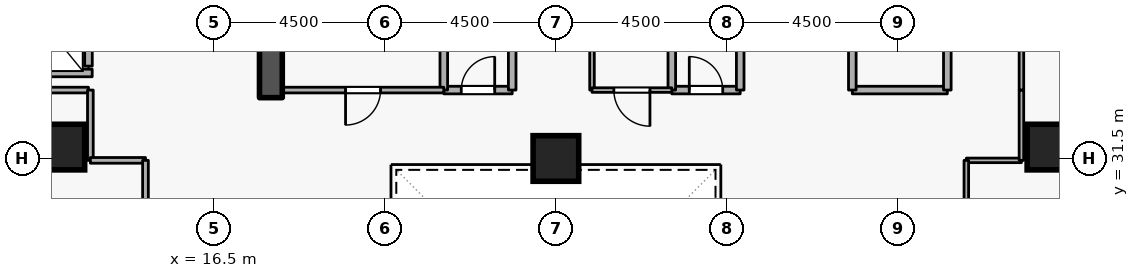
"""IFC4 building model, lengths in metres.
Left out: names, types, materials, properties, quantities, classifications, styles, units other than length and angle.
Written with IfcOpenShell. Run it as: python <this file> out.ifc"""

import sys

from ifc_helpers import new_model, si_unit, direction, frame, frame_2d, origin, origin_2d, place, context, subcontext, project, spatial, rectangle, extrude, element, fill, save


model = new_model("IFC4")
c1 = context("Model", 3, precision=1e-05, world=origin(), true_north=direction((0.0, 1.0)))
c2 = subcontext(c1, "Body", "Model", "MODEL_VIEW")
j1 = project(units=[si_unit("LENGTHUNIT", "METRE"), si_unit("PLANEANGLEUNIT", "RADIAN")], contexts=[c1])
p1 = place(None, origin())
s1 = spatial("IfcSite", under=j1, at=p1, CompositionType="ELEMENT")
p2 = place(p1, origin())
s2 = spatial("IfcBuilding", under=s1, at=p2, CompositionType="ELEMENT")
p3 = place(p2, frame((0.0, 0.0, 105.3)))
s3 = spatial("IfcBuildingStorey", under=s2, at=p3, CompositionType="ELEMENT", Elevation=105.3)
p4 = place(p3, frame((18.0, 33.1, 0.0), z_axis=(0.0, 0.0, 1.0), x_axis=(0.0, 1.0, 0.0)))
e1 = element("IfcWall", 1, at=p4, inside=s3, PredefinedType="SHEAR", context=c2, shape_type="SweptSolid", body=[
    extrude(rectangle(XDim=5.7, YDim=0.6, at=frame_2d((2.85, 0.0))), origin(), (0.0, 0.0, 1.0), 3.6),
])
for number, where, z_axis, x_axis in (
    (2, (12.5, 31.8, 0.0), (0.0, 0.0, 1.0), (1.0, 0.0, 0.0)),
    (3, (38.5, 31.8, 0.0), (0.0, 0.0, 1.0), (1.0, 0.0, 0.0)),
    (4, (25.5, 31.5, 0.0), (0.0, 0.0, 1.0), (1.0, 0.0, 0.0)),
):
    element("IfcColumn", number, at=place(p3, frame(where, z_axis=z_axis, x_axis=x_axis)), inside=s3, PredefinedType="COLUMN", context=c2, shape_type="SweptSolid", body=[
        extrude(rectangle(XDim=1.2, YDim=1.2, at=origin_2d()), origin(), (0.0, 0.0, 1.0), 3.6),
    ])
p5 = place(p3, frame((13.2, 33.93, 0.0), z_axis=(0.0, 0.0, 1.0), x_axis=(0.0, 1.0, 0.0)))
e5 = element("IfcWall", 5, at=p5, inside=s3, PredefinedType="STANDARD", context=c2, shape_type="SweptSolid", body=[
    extrude(rectangle(XDim=1.94, YDim=0.2, at=frame_2d((0.97, 0.0))), origin(), (0.0, 0.0, 1.0), 3.34),
])
p6 = place(p5, frame((0.46, 0.0, 0.0)))
e6 = element("IfcOpeningElement", 6, at=p6, cuts=e5, PredefinedType="OPENING", context=c2, shape_type="SweptSolid", body=[
    extrude(rectangle(XDim=1.02, YDim=2.06, at=frame_2d((0.51, 1.03))), frame((0.0, 0.11, 0.0), z_axis=(0.0, -1.0, 0.0), x_axis=(1.0, 0.0, 0.0)), (0.0, 0.0, 1.0), 0.22),
])
p7 = place(p3, frame((11.002, 33.75, 0.0), z_axis=(0.0, 0.0, 1.0), x_axis=(1.0, 0.0, 0.0)))
e7 = element("IfcWall", 7, at=p7, inside=s3, PredefinedType="STANDARD", context=c2, shape_type="SweptSolid", body=[
    extrude(rectangle(XDim=2.296, YDim=0.2, at=frame_2d((1.148, 0.0))), origin(), (0.0, 0.0, 1.0), 3.34),
])
p8 = place(p3, frame((33.3, 33.3, 0.0), z_axis=(0.0, 0.0, 1.0), x_axis=(1.0, 0.0, 0.0)))
e8 = element("IfcWall", 8, at=p8, inside=s3, PredefinedType="STANDARD", context=c2, shape_type="SweptSolid", body=[
    extrude(rectangle(XDim=2.5, YDim=0.2, at=frame_2d((1.25, 0.0))), origin(), (0.0, 0.0, 1.0), 3.34),
])
p9 = place(p3, frame((35.8, 33.3, 0.0), z_axis=(0.0, 0.0, 1.0), x_axis=(0.0, 1.0, 0.0)))
e9 = element("IfcWall", 9, at=p9, inside=s3, PredefinedType="STANDARD", context=c2, shape_type="SweptSolid", body=[
    extrude(rectangle(XDim=5.7, YDim=0.2, at=frame_2d((2.85, 0.0))), origin(), (0.0, 0.0, 1.0), 3.34),
])
p10 = place(p9, frame((2.275, 0.0, 0.0)))
e10 = element("IfcOpeningElement", 10, at=p10, cuts=e9, PredefinedType="OPENING", context=c2, shape_type="SweptSolid", body=[
    extrude(rectangle(XDim=1.15, YDim=2.1, at=frame_2d((0.575, 1.05))), frame((0.0, 0.11, 0.0), z_axis=(0.0, -1.0, 0.0), x_axis=(1.0, 0.0, 0.0)), (0.0, 0.0, 1.0), 0.22),
])
p11 = place(p3, frame((33.3, 35.6, 0.0), z_axis=(0.0, 0.0, 1.0), x_axis=(0.0, -1.0, 0.0)))
e11 = element("IfcWall", 11, at=p11, inside=s3, PredefinedType="STANDARD", context=c2, shape_type="SweptSolid", body=[
    extrude(rectangle(XDim=2.3, YDim=0.2, at=frame_2d((1.15, 0.0))), origin(), (0.0, 0.0, 1.0), 2.545),
])
p12 = place(p3, frame((22.55, 33.3, 0.0), z_axis=(0.0, 0.0, 1.0), x_axis=(1.0, 0.0, 0.0)))
e12 = element("IfcWall", 12, at=p12, inside=s3, PredefinedType="STANDARD", context=c2, shape_type="SweptSolid", body=[
    extrude(rectangle(XDim=1.8, YDim=0.2, at=frame_2d((0.9, 0.0))), origin(), (0.0, 0.0, 1.0), 3.34),
])
p13 = place(p12, frame((0.46, 0.0, 0.0)))
e13 = element("IfcOpeningElement", 13, at=p13, cuts=e12, PredefinedType="OPENING", context=c2, shape_type="SweptSolid", body=[
    extrude(rectangle(XDim=0.88, YDim=2.04, at=frame_2d((0.44, 1.02))), frame((0.0, 0.11, 0.0), z_axis=(0.0, -1.0, 0.0), x_axis=(1.0, 0.0, 0.0)), (0.0, 0.0, 1.0), 0.22),
])
for number, where, z_axis, x_axis in (
    (14, (24.35, 33.3, 0.0), (0.0, 0.0, 1.0), (0.0, 1.0, 0.0)),
    (15, (22.55, 35.35, 0.0), (0.0, 0.0, 1.0), (0.0, -1.0, 0.0)),
):
    element("IfcWall", number, at=place(p3, frame(where, z_axis=z_axis, x_axis=x_axis)), inside=s3, PredefinedType="STANDARD", context=c2, shape_type="SweptSolid", body=[
        extrude(rectangle(XDim=2.05, YDim=0.2, at=frame_2d((1.025, 0.0))), origin(), (0.0, 0.0, 1.0), 3.34),
    ])
p14 = place(p3, frame((28.55, 33.3, 0.0), z_axis=(0.0, 0.0, 1.0), x_axis=(1.0, 0.0, 0.0)))
e16 = element("IfcWall", 16, at=p14, inside=s3, PredefinedType="STANDARD", context=c2, shape_type="SweptSolid", body=[
    extrude(rectangle(XDim=1.8, YDim=0.2, at=frame_2d((0.9, 0.0))), origin(), (0.0, 0.0, 1.0), 3.34),
])
p15 = place(p14, frame((0.46, 0.0, 0.0)))
e17 = element("IfcOpeningElement", 17, at=p15, cuts=e16, PredefinedType="OPENING", context=c2, shape_type="SweptSolid", body=[
    extrude(rectangle(XDim=0.88, YDim=2.04, at=frame_2d((0.44, 1.02))), frame((0.0, 0.11, 0.0), z_axis=(0.0, -1.0, 0.0), x_axis=(1.0, 0.0, 0.0)), (0.0, 0.0, 1.0), 0.22),
])
for number, where, z_axis, x_axis in (
    (18, (30.35, 33.3, 0.0), (0.0, 0.0, 1.0), (0.0, 1.0, 0.0)),
    (19, (28.55, 35.35, 0.0), (0.0, 0.0, 1.0), (0.0, -1.0, 0.0)),
):
    element("IfcWall", number, at=place(p3, frame(where, z_axis=z_axis, x_axis=x_axis)), inside=s3, PredefinedType="STANDARD", context=c2, shape_type="SweptSolid", body=[
        extrude(rectangle(XDim=2.05, YDim=0.2, at=frame_2d((1.025, 0.0))), origin(), (0.0, 0.0, 1.0), 3.34),
    ])
p16 = place(p3, frame((22.55, 33.3, 0.0), z_axis=(0.0, 0.0, 1.0), x_axis=(-1.0, 0.0, 0.0)))
e20 = element("IfcWall", 20, at=p16, inside=s3, PredefinedType="PARTITIONING", context=c2, shape_type="SweptSolid", body=[
    extrude(rectangle(XDim=4.25, YDim=0.15, at=frame_2d((2.125, 0.0))), origin(), (0.0, 0.0, 1.0), 3.34),
])
p17 = place(p16, frame((1.665, 0.0, 0.0)))
e21 = element("IfcOpeningElement", 21, at=p17, cuts=e20, PredefinedType="OPENING", context=c2, shape_type="SweptSolid", body=[
    extrude(rectangle(XDim=0.92, YDim=2.08, at=frame_2d((0.46, 1.04))), frame((0.0, 0.085, 0.0), z_axis=(0.0, -1.0, 0.0), x_axis=(1.0, 0.0, 0.0)), (0.0, 0.0, 1.0), 0.17),
])
p18 = place(p3, frame((26.45, 33.3, 0.0), z_axis=(0.0, 0.0, 1.0), x_axis=(0.0, 1.0, 0.0)))
e22 = element("IfcWall", 22, at=p18, inside=s3, PredefinedType="PARTITIONING", context=c2, shape_type="SweptSolid", body=[
    extrude(rectangle(XDim=2.05, YDim=0.12, at=frame_2d((1.025, 0.0))), origin(), (0.0, 0.0, 1.0), 3.34),
])
p19 = place(p3, frame((28.55, 33.3, 0.0), z_axis=(0.0, 0.0, 1.0), x_axis=(-1.0, 0.0, 0.0)))
e23 = element("IfcWall", 23, at=p19, inside=s3, PredefinedType="PARTITIONING", context=c2, shape_type="SweptSolid", body=[
    extrude(rectangle(XDim=2.1, YDim=0.12, at=frame_2d((1.05, 0.0))), origin(), (0.0, 0.0, 1.0), 3.34),
])
p20 = place(p19, frame((0.575, 0.0, 0.0)))
e24 = element("IfcOpeningElement", 24, at=p20, cuts=e23, PredefinedType="OPENING", context=c2, shape_type="SweptSolid", body=[
    extrude(rectangle(XDim=0.95, YDim=2.1, at=frame_2d((0.475, 1.05))), frame((0.0, 0.07, 0.0), z_axis=(0.0, -1.0, 0.0), x_axis=(1.0, 0.0, 0.0)), (0.0, 0.0, 1.0), 0.14),
])
p21 = place(p3, frame((10.9, 33.3, 0.0), z_axis=(0.0, 0.0, 1.0), x_axis=(1.0, 0.0, 0.0)))
e25 = element("IfcWall", 25, at=p21, inside=s3, PredefinedType="PARTITIONING", context=c2, shape_type="SweptSolid", body=[
    extrude(rectangle(XDim=2.3, YDim=0.15, at=frame_2d((1.15, 0.0))), origin(), (0.0, 0.0, 1.0), 3.34),
])
p22 = place(p3, frame((13.25, 33.3, 0.0), z_axis=(0.0, 0.0, 1.0), x_axis=(0.0, -1.0, 0.0)))
e26 = element("IfcWall", 26, at=p22, inside=s3, PredefinedType="PARTITIONING", context=c2, shape_type="SweptSolid", body=[
    extrude(rectangle(XDim=1.85, YDim=0.15, at=frame_2d((0.925, 0.0))), origin(), (0.0, 0.0, 1.0), 3.34),
])
p23 = place(p3, frame((13.25, 31.45, 0.0), z_axis=(0.0, 0.0, 1.0), x_axis=(1.0, 0.0, 0.0)))
e27 = element("IfcWall", 27, at=p23, inside=s3, PredefinedType="PARTITIONING", context=c2, shape_type="SweptSolid", body=[
    extrude(rectangle(XDim=1.45, YDim=0.15, at=frame_2d((0.725, 0.0))), origin(), (0.0, 0.0, 1.0), 3.34),
])
p24 = place(p3, frame((14.7, 31.45, 0.0), z_axis=(0.0, 0.0, 1.0), x_axis=(0.0, -1.0, 0.0)))
e28 = element("IfcWall", 28, at=p24, inside=s3, PredefinedType="PARTITIONING", context=c2, shape_type="SweptSolid", body=[
    extrude(rectangle(XDim=4.45, YDim=0.15, at=frame_2d((2.225, 0.0))), origin(), (0.0, 0.0, 1.0), 3.34),
])
p25 = place(p24, frame((1.575, 0.0, 0.0)))
e29 = element("IfcOpeningElement", 29, at=p25, cuts=e28, PredefinedType="OPENING", context=c2, shape_type="SweptSolid", body=[
    extrude(rectangle(XDim=1.3, YDim=2.12, at=frame_2d((0.65, 1.06))), frame((0.0, 0.085, 0.0), z_axis=(0.0, -1.0, 0.0), x_axis=(1.0, 0.0, 0.0)), (0.0, 0.0, 1.0), 0.17),
])
p26 = place(p3, frame((36.3, 31.45, 0.0), z_axis=(0.0, 0.0, 1.0), x_axis=(1.0, 0.0, 0.0)))
e30 = element("IfcWall", 30, at=p26, inside=s3, PredefinedType="PARTITIONING", context=c2, shape_type="SweptSolid", body=[
    extrude(rectangle(XDim=1.45, YDim=0.12, at=frame_2d((0.725, 0.0))), origin(), (0.0, 0.0, 1.0), 3.34),
])
p27 = place(p3, frame((37.75, 31.45, 0.0), z_axis=(0.0, 0.0, 1.0), x_axis=(0.0, 1.0, 0.0)))
e31 = element("IfcWall", 31, at=p27, inside=s3, PredefinedType="PARTITIONING", context=c2, shape_type="SweptSolid", body=[
    extrude(rectangle(XDim=1.85, YDim=0.12, at=frame_2d((0.925, 0.0))), origin(), (0.0, 0.0, 1.0), 3.34),
])
p28 = place(p3, frame((37.75, 33.3, 0.0), z_axis=(0.0, 0.0, 1.0), x_axis=(0.0, 1.0, 0.0)))
e32 = element("IfcWall", 32, at=p28, inside=s3, PredefinedType="PARTITIONING", context=c2, shape_type="SweptSolid", body=[
    extrude(rectangle(XDim=9.35, YDim=0.12, at=frame_2d((4.675, 0.0))), origin(), (0.0, 0.0, 1.0), 3.34),
])
p29 = place(p28, frame((4.15, 0.0, 0.0)))
e33 = element("IfcOpeningElement", 33, at=p29, cuts=e32, PredefinedType="OPENING", context=c2, shape_type="SweptSolid", body=[
    extrude(rectangle(XDim=1.05, YDim=2.1, at=frame_2d((0.525, 1.05))), frame((0.0, 0.07, 0.0), z_axis=(0.0, -1.0, 0.0), x_axis=(1.0, 0.0, 0.0)), (0.0, 0.0, 1.0), 0.14),
])
p30 = place(p3, frame((36.3, 27.0, 0.0), z_axis=(0.0, 0.0, 1.0), x_axis=(0.0, 1.0, 0.0)))
e34 = element("IfcWall", 34, at=p30, inside=s3, PredefinedType="PARTITIONING", context=c2, shape_type="SweptSolid", body=[
    extrude(rectangle(XDim=4.45, YDim=0.12, at=frame_2d((2.225, 0.0))), origin(), (0.0, 0.0, 1.0), 3.34),
])
p31 = place(p13, origin())
e35 = element("IfcDoor", 35, at=p31, inside=s3, OperationType="SINGLE_SWING_RIGHT", PredefinedType="DOOR", context=c2, shape_type="SweptSolid", body=[
    extrude(rectangle(XDim=0.88, YDim=2.04, at=frame_2d((0.44, 1.02))), frame((0.0, 0.025, 0.0), z_axis=(0.0, -1.0, 0.0), x_axis=(1.0, 0.0, 0.0)), (0.0, 0.0, 1.0), 0.05),
])
fill(e13, e35)
p32 = place(p15, origin())
e36 = element("IfcDoor", 36, at=p32, inside=s3, OperationType="SINGLE_SWING_LEFT", PredefinedType="DOOR", context=c2, shape_type="SweptSolid", body=[
    extrude(rectangle(XDim=0.88, YDim=2.04, at=frame_2d((0.44, 1.02))), frame((0.0, 0.025, 0.0), z_axis=(0.0, -1.0, 0.0), x_axis=(1.0, 0.0, 0.0)), (0.0, 0.0, 1.0), 0.05),
])
fill(e17, e36)
p33 = place(p17, origin())
e37 = element("IfcDoor", 37, at=p33, inside=s3, OperationType="SINGLE_SWING_RIGHT", PredefinedType="DOOR", context=c2, shape_type="SweptSolid", body=[
    extrude(rectangle(XDim=0.92, YDim=2.08, at=frame_2d((0.46, 1.04))), frame((0.0, 0.025, 0.0), z_axis=(0.0, -1.0, 0.0), x_axis=(1.0, 0.0, 0.0)), (0.0, 0.0, 1.0), 0.05),
])
fill(e21, e37)
p34 = place(p20, origin())
e38 = element("IfcDoor", 38, at=p34, inside=s3, OperationType="SINGLE_SWING_LEFT", PredefinedType="DOOR", context=c2, shape_type="SweptSolid", body=[
    extrude(rectangle(XDim=0.95, YDim=2.1, at=frame_2d((0.475, 1.05))), frame((0.0, 0.025, 0.0), z_axis=(0.0, -1.0, 0.0), x_axis=(1.0, 0.0, 0.0)), (0.0, 0.0, 1.0), 0.05),
])
fill(e24, e38)
save(model, sys.argv[1])
